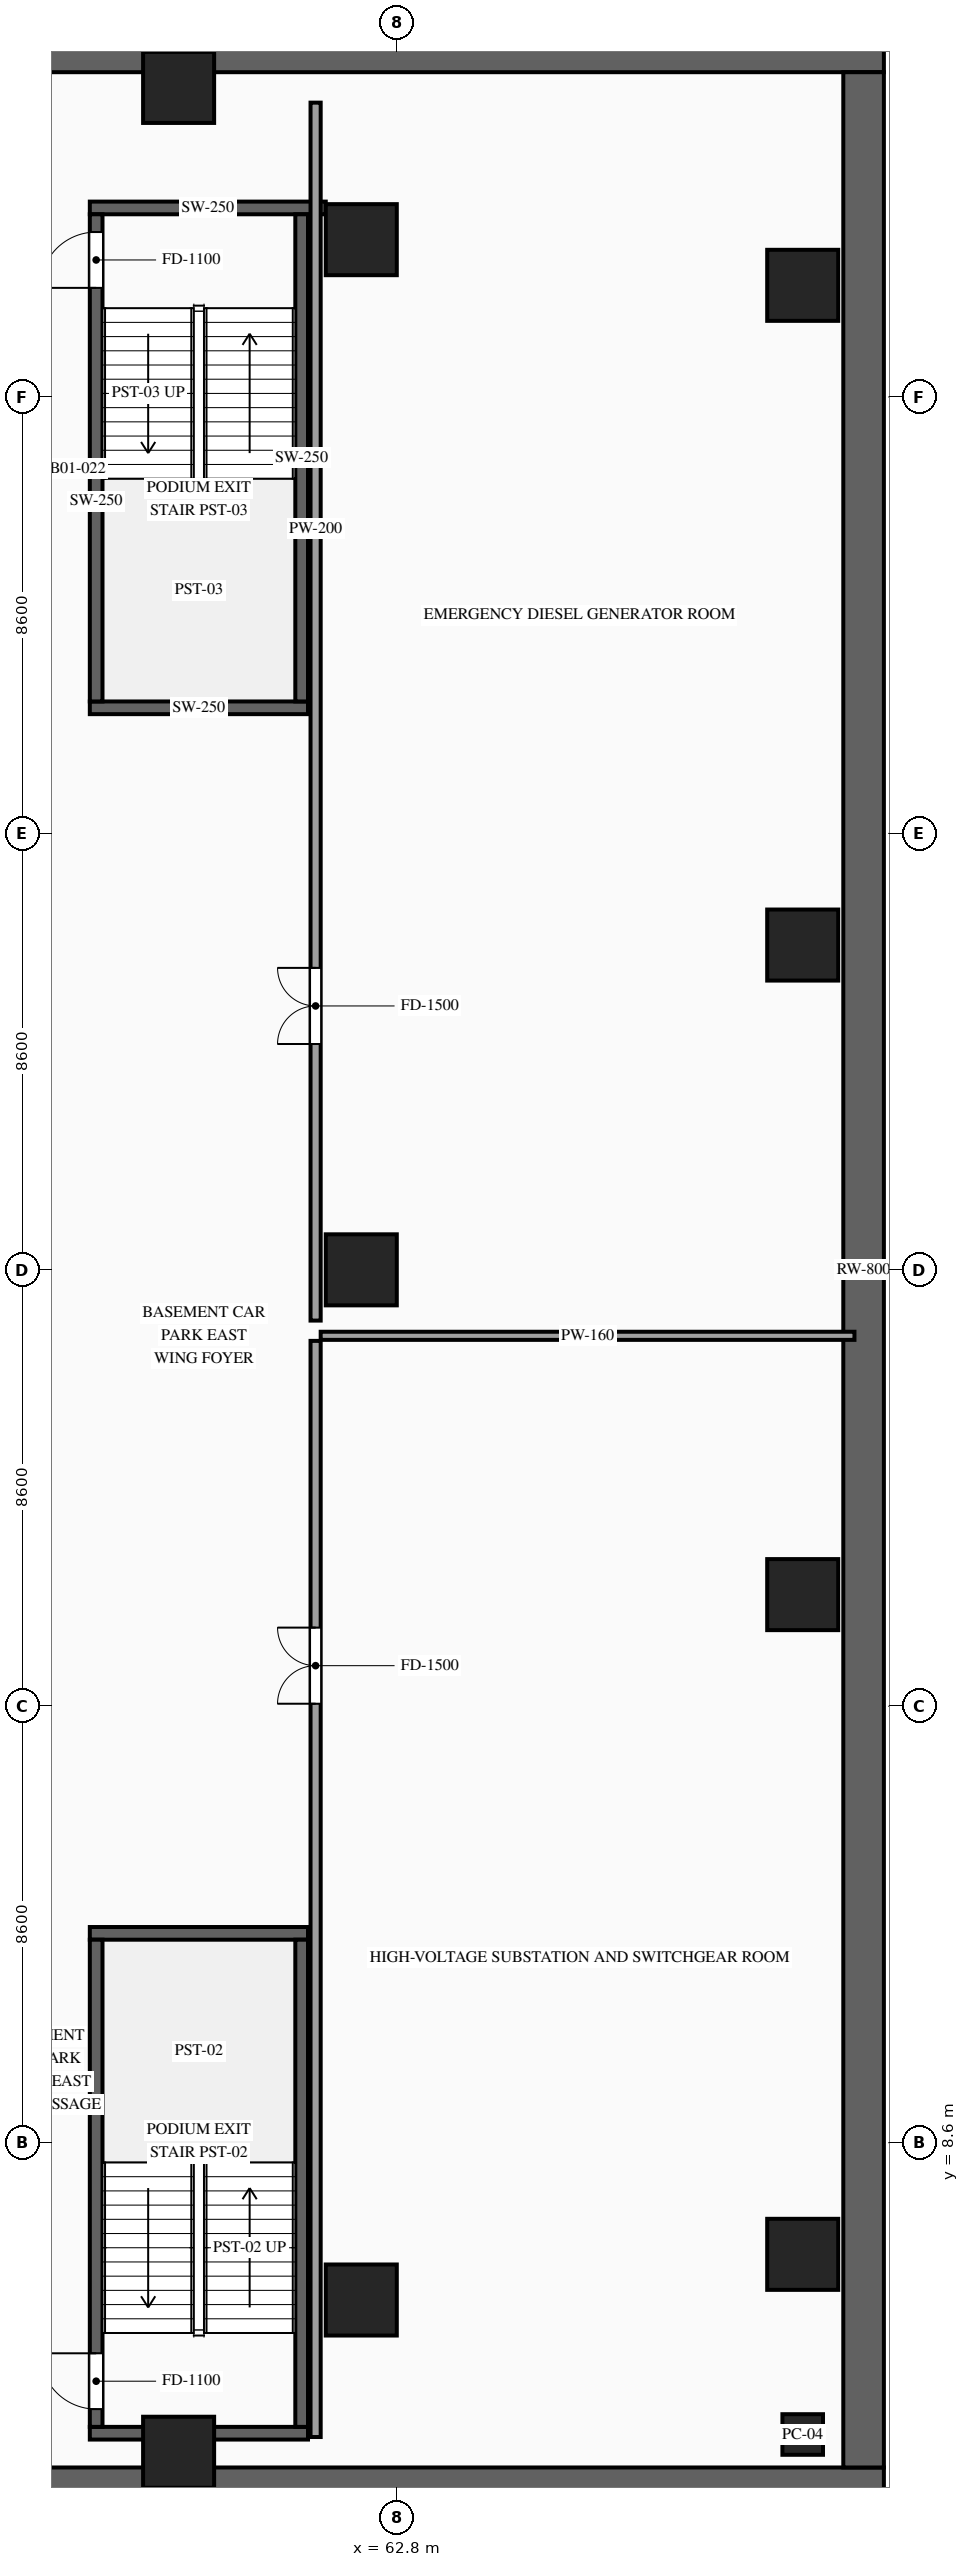
"""IFC4 building model, lengths in metres.
Left out: names, types, materials, properties, quantities, classifications, styles, units other than length and angle.
Written with IfcOpenShell. Run it as: python <this file> out.ifc"""

import sys

from ifc_helpers import new_model, si_unit, direction, frame, frame_2d, origin, origin_2d, place, context, subcontext, project, spatial, rectangle, extrude, source, transform, mapped, element, fill, save


model = new_model("IFC4")
c1 = context("Model", 3, precision=1e-05, world=origin(), true_north=direction((0.0, 1.0)))
c2 = subcontext(c1, "Body", "Model", "MODEL_VIEW")
j1 = project(units=[si_unit("LENGTHUNIT", "METRE"), si_unit("PLANEANGLEUNIT", "RADIAN")], contexts=[c1])
p1 = place(None, origin())
s1 = spatial("IfcSite", under=j1, at=p1, CompositionType="ELEMENT")
p2 = place(p1, origin())
s2 = spatial("IfcBuilding", under=s1, at=p2, CompositionType="ELEMENT")
p3 = place(p2, frame((0.0, 0.0, -4.5)))
s3 = spatial("IfcBuildingStorey", under=s2, at=p3, CompositionType="ELEMENT", Elevation=-4.5)
m1 = source(origin(), c2, "Body", "SweptSolid", [
    extrude(rectangle(XDim=70.8, YDim=0.8, at=frame_2d((35.4, 0.0))), origin(), (0.0, 0.0, 1.0), 4.5),
])
for number, where, z_axis, x_axis in (
    (1, (1.6, 1.8, 0.0), (0.0, 0.0, 1.0), (1.0, 0.0, 0.0)),
    (2, (1.6, 49.8, 0.0), (0.0, 0.0, 1.0), (1.0, 0.0, 0.0)),
):
    element("IfcWall", number, at=place(p3, frame(where, z_axis=z_axis, x_axis=x_axis)), inside=s3, PredefinedType="USERDEFINED", context=c2, shape_type="MappedRepresentation", body=[
        mapped(m1, transform((0.0, 0.0, 0.0), scale=1.0)),
    ])
m2 = source(origin(), c2, "Body", "SweptSolid", [
    extrude(rectangle(XDim=47.2, YDim=0.8, at=frame_2d((23.6, 0.0))), origin(), (0.0, 0.0, 1.0), 4.5),
])
p4 = place(p3, frame((72.0, 2.2, 0.0), z_axis=(0.0, 0.0, 1.0), x_axis=(0.0, 1.0, 0.0)))
e3 = element("IfcWall", 3, at=p4, inside=s3, PredefinedType="USERDEFINED", context=c2, shape_type="MappedRepresentation", body=[
    mapped(m2, transform((0.0, 0.0, 0.0), scale=1.0)),
])
m3 = source(origin(), c2, "Body", "SweptSolid", [
    extrude(rectangle(XDim=0.8, YDim=0.8, at=origin_2d()), origin(), (0.0, 0.0, 1.0), 4.5),
])
p5 = place(p3, frame((70.8, 2.85, 0.0), z_axis=(0.0, 0.0, 1.0), x_axis=(1.0, 0.0, 0.0)))
e4 = element("IfcColumn", 4, at=p5, inside=s3, PredefinedType="COLUMN", context=c2, shape_type="MappedRepresentation", body=[
    mapped(m3, transform((0.0, 0.0, 0.0), scale=1.0)),
])
m4 = source(origin(), c2, "Body", "SweptSolid", [
    extrude(rectangle(XDim=1.4, YDim=1.4, at=origin_2d()), origin(), (0.0, 0.0, 1.0), 4.5),
])
for number, where, z_axis, x_axis in (
    (5, (70.8, 6.4, 0.0), (0.0, 0.0, 1.0), (1.0, 0.0, 0.0)),
    (6, (70.8, 19.4, 0.0), (0.0, 0.0, 1.0), (1.0, 0.0, 0.0)),
    (7, (70.8, 32.2, 0.0), (0.0, 0.0, 1.0), (1.0, 0.0, 0.0)),
    (8, (70.8, 45.2, 0.0), (0.0, 0.0, 1.0), (1.0, 0.0, 0.0)),
    (9, (62.1, 5.5, 0.0), (0.0, 0.0, 1.0), (1.0, 0.0, 0.0)),
    (10, (62.1, 25.8, 0.0), (0.0, 0.0, 1.0), (1.0, 0.0, 0.0)),
    (11, (62.1, 46.1, 0.0), (0.0, 0.0, 1.0), (1.0, 0.0, 0.0)),
    (12, (58.5, 2.5, 0.0), (0.0, 0.0, 1.0), (1.0, 0.0, 0.0)),
    (13, (58.5, 49.1, 0.0), (0.0, 0.0, 1.0), (1.0, 0.0, 0.0)),
):
    element("IfcColumn", number, at=place(p3, frame(where, z_axis=z_axis, x_axis=x_axis)), inside=s3, PredefinedType="COLUMN", context=c2, shape_type="MappedRepresentation", body=[
        mapped(m4, transform((0.0, 0.0, 0.0), scale=1.0)),
    ])
m5 = source(origin(), c2, "Body", "SweptSolid", [
    extrude(rectangle(XDim=4.3, YDim=0.25, at=frame_2d((2.15, 0.0))), origin(), (0.0, 0.0, 1.0), 4.2),
])
for number, where, z_axis, x_axis in (
    (14, (56.75, 2.875, 0.0), (0.0, 0.0, 1.0), (1.0, 0.0, 0.0)),
    (15, (56.75, 12.725, 0.0), (0.0, 0.0, 1.0), (1.0, 0.0, 0.0)),
):
    element("IfcWall", number, at=place(p3, frame(where, z_axis=z_axis, x_axis=x_axis)), inside=s3, PredefinedType="SOLIDWALL", context=c2, shape_type="MappedRepresentation", body=[
        mapped(m5, transform((0.0, 0.0, 0.0), scale=1.0)),
    ])
p6 = place(p3, frame((56.875, 3.0, 0.0), z_axis=(0.0, 0.0, 1.0), x_axis=(0.0, 1.0, 0.0)))
e16 = element("IfcWall", 16, at=p6, inside=s3, PredefinedType="SOLIDWALL", context=c2, shape_type="SweptSolid", body=[
    extrude(rectangle(XDim=9.6, YDim=0.25, at=frame_2d((4.8, 0.0))), origin(), (0.0, 0.0, 1.0), 4.2),
])
p7 = place(p6, frame((0.35, 0.0, 0.0)))
e17 = element("IfcOpeningElement", 17, at=p7, cuts=e16, PredefinedType="OPENING", context=c2, shape_type="SweptSolid", body=[
    extrude(rectangle(XDim=1.1, YDim=2.2, at=frame_2d((0.55, 1.1))), frame((0.0, 0.14, 0.0), z_axis=(0.0, -1.0, 0.0), x_axis=(1.0, 0.0, 0.0)), (0.0, 0.0, 1.0), 0.28),
])
m6 = source(origin(), c2, "Body", "SweptSolid", [
    extrude(rectangle(XDim=9.6, YDim=0.25, at=frame_2d((4.8, 0.0))), origin(), (0.0, 0.0, 1.0), 4.2),
])
p8 = place(p3, frame((60.925, 3.0, 0.0), z_axis=(0.0, 0.0, 1.0), x_axis=(0.0, 1.0, 0.0)))
e18 = element("IfcWall", 18, at=p8, inside=s3, PredefinedType="SOLIDWALL", context=c2, shape_type="MappedRepresentation", body=[
    mapped(m6, transform((0.0, 0.0, 0.0), scale=1.0)),
])
p9 = place(p3, frame((56.75, 36.875, 0.0), z_axis=(0.0, 0.0, 1.0), x_axis=(1.0, 0.0, 0.0)))
e19 = element("IfcWall", 19, at=p9, inside=s3, PredefinedType="SOLIDWALL", context=c2, shape_type="MappedRepresentation", body=[
    mapped(m5, transform((0.0, 0.0, 0.0), scale=1.0)),
])
m7 = source(origin(), c2, "Body", "SweptSolid", [
    extrude(rectangle(XDim=4.65, YDim=0.25, at=frame_2d((2.325, 0.0))), origin(), (0.0, 0.0, 1.0), 4.2),
])
p10 = place(p3, frame((56.75, 46.725, 0.0), z_axis=(0.0, 0.0, 1.0), x_axis=(1.0, 0.0, 0.0)))
e20 = element("IfcWall", 20, at=p10, inside=s3, PredefinedType="SOLIDWALL", context=c2, shape_type="MappedRepresentation", body=[
    mapped(m7, transform((0.0, 0.0, 0.0), scale=1.0)),
])
p11 = place(p3, frame((56.875, 37.0, 0.0), z_axis=(0.0, 0.0, 1.0), x_axis=(0.0, 1.0, 0.0)))
e21 = element("IfcWall", 21, at=p11, inside=s3, PredefinedType="SOLIDWALL", context=c2, shape_type="SweptSolid", body=[
    extrude(rectangle(XDim=9.6, YDim=0.25, at=frame_2d((4.8, 0.0))), origin(), (0.0, 0.0, 1.0), 4.2),
])
p12 = place(p11, frame((8.15, 0.0, 0.0)))
e22 = element("IfcOpeningElement", 22, at=p12, cuts=e21, PredefinedType="OPENING", context=c2, shape_type="SweptSolid", body=[
    extrude(rectangle(XDim=1.1, YDim=2.2, at=frame_2d((0.55, 1.1))), frame((0.0, 0.14, 0.0), z_axis=(0.0, -1.0, 0.0), x_axis=(1.0, 0.0, 0.0)), (0.0, 0.0, 1.0), 0.28),
])
p13 = place(p3, frame((60.925, 37.0, 0.0), z_axis=(0.0, 0.0, 1.0), x_axis=(0.0, 1.0, 0.0)))
e23 = element("IfcWall", 23, at=p13, inside=s3, PredefinedType="SOLIDWALL", context=c2, shape_type="MappedRepresentation", body=[
    mapped(m6, transform((0.0, 0.0, 0.0), scale=1.0)),
])
p14 = place(p3, frame((61.2, 2.8, 0.0), z_axis=(0.0, 0.0, 1.0), x_axis=(0.0, 1.0, 0.0)))
e24 = element("IfcWall", 24, at=p14, inside=s3, PredefinedType="PARTITIONING", context=c2, shape_type="SweptSolid", body=[
    extrude(rectangle(XDim=21.6, YDim=0.2, at=frame_2d((10.8, 0.0))), origin(), (0.0, 0.0, 1.0), 4.2),
])
p15 = place(p14, frame((14.45, 0.0, 0.0)))
e25 = element("IfcOpeningElement", 25, at=p15, cuts=e24, PredefinedType="OPENING", context=c2, shape_type="SweptSolid", body=[
    extrude(rectangle(XDim=1.5, YDim=2.3, at=frame_2d((0.75, 1.15))), frame((0.0, 0.115, 0.0), z_axis=(0.0, -1.0, 0.0), x_axis=(1.0, 0.0, 0.0)), (0.0, 0.0, 1.0), 0.23),
])
m8 = source(origin(), c2, "Body", "SweptSolid", [
    extrude(rectangle(XDim=10.52, YDim=0.16, at=frame_2d((5.26, 0.0))), origin(), (0.0, 0.0, 1.0), 4.2),
])
p16 = place(p3, frame((61.3, 24.5, 0.0), z_axis=(0.0, 0.0, 1.0), x_axis=(1.0, 0.0, 0.0)))
e26 = element("IfcWall", 26, at=p16, inside=s3, PredefinedType="PARTITIONING", context=c2, shape_type="MappedRepresentation", body=[
    mapped(m8, transform((0.0, 0.0, 0.0), scale=1.0)),
])
p17 = place(p3, frame((61.2, 24.8, 0.0), z_axis=(0.0, 0.0, 1.0), x_axis=(0.0, 1.0, 0.0)))
e27 = element("IfcWall", 27, at=p17, inside=s3, PredefinedType="PARTITIONING", context=c2, shape_type="SweptSolid", body=[
    extrude(rectangle(XDim=24.0, YDim=0.2, at=frame_2d((12.0, 0.0))), origin(), (0.0, 0.0, 1.0), 4.2),
])
p18 = place(p17, frame((5.45, 0.0, 0.0)))
e28 = element("IfcOpeningElement", 28, at=p18, cuts=e27, PredefinedType="OPENING", context=c2, shape_type="SweptSolid", body=[
    extrude(rectangle(XDim=1.5, YDim=2.3, at=frame_2d((0.75, 1.15))), frame((0.0, 0.115, 0.0), z_axis=(0.0, -1.0, 0.0), x_axis=(1.0, 0.0, 0.0)), (0.0, 0.0, 1.0), 0.23),
])
m9 = source(origin(), c2, "Body", "SweptSolid", [
    extrude(rectangle(XDim=1.1, YDim=2.2, at=frame_2d((0.55, 1.1))), frame((0.0, 0.025, 0.0), z_axis=(0.0, -1.0, 0.0), x_axis=(1.0, 0.0, 0.0)), (0.0, 0.0, 1.0), 0.05),
])
p19 = place(p7, origin())
e29 = element("IfcDoor", 29, at=p19, inside=s3, OperationType="SINGLE_SWING_RIGHT", PredefinedType="DOOR", context=c2, shape_type="MappedRepresentation", body=[
    mapped(m9, transform((0.0, 0.0, 0.0), scale=1.0)),
])
fill(e17, e29)
p20 = place(p12, origin())
e30 = element("IfcDoor", 30, at=p20, inside=s3, OperationType="SINGLE_SWING_LEFT", PredefinedType="DOOR", context=c2, shape_type="MappedRepresentation", body=[
    mapped(m9, transform((0.0, 0.0, 0.0), scale=1.0)),
])
fill(e22, e30)
m10 = source(origin(), c2, "Body", "SweptSolid", [
    extrude(rectangle(XDim=1.5, YDim=2.3, at=frame_2d((0.75, 1.15))), frame((0.0, 0.025, 0.0), z_axis=(0.0, -1.0, 0.0), x_axis=(1.0, 0.0, 0.0)), (0.0, 0.0, 1.0), 0.05),
])
p21 = place(p15, origin())
e31 = element("IfcDoor", 31, at=p21, inside=s3, OperationType="DOUBLE_DOOR_SINGLE_SWING", PredefinedType="DOOR", context=c2, shape_type="MappedRepresentation", body=[
    mapped(m10, transform((0.0, 0.0, 0.0), scale=1.0)),
])
fill(e25, e31)
p22 = place(p18, origin())
e32 = element("IfcDoor", 32, at=p22, inside=s3, OperationType="DOUBLE_DOOR_SINGLE_SWING", PredefinedType="DOOR", context=c2, shape_type="MappedRepresentation", body=[
    mapped(m10, transform((0.0, 0.0, 0.0), scale=1.0)),
])
fill(e28, e32)
save(model, sys.argv[1])
